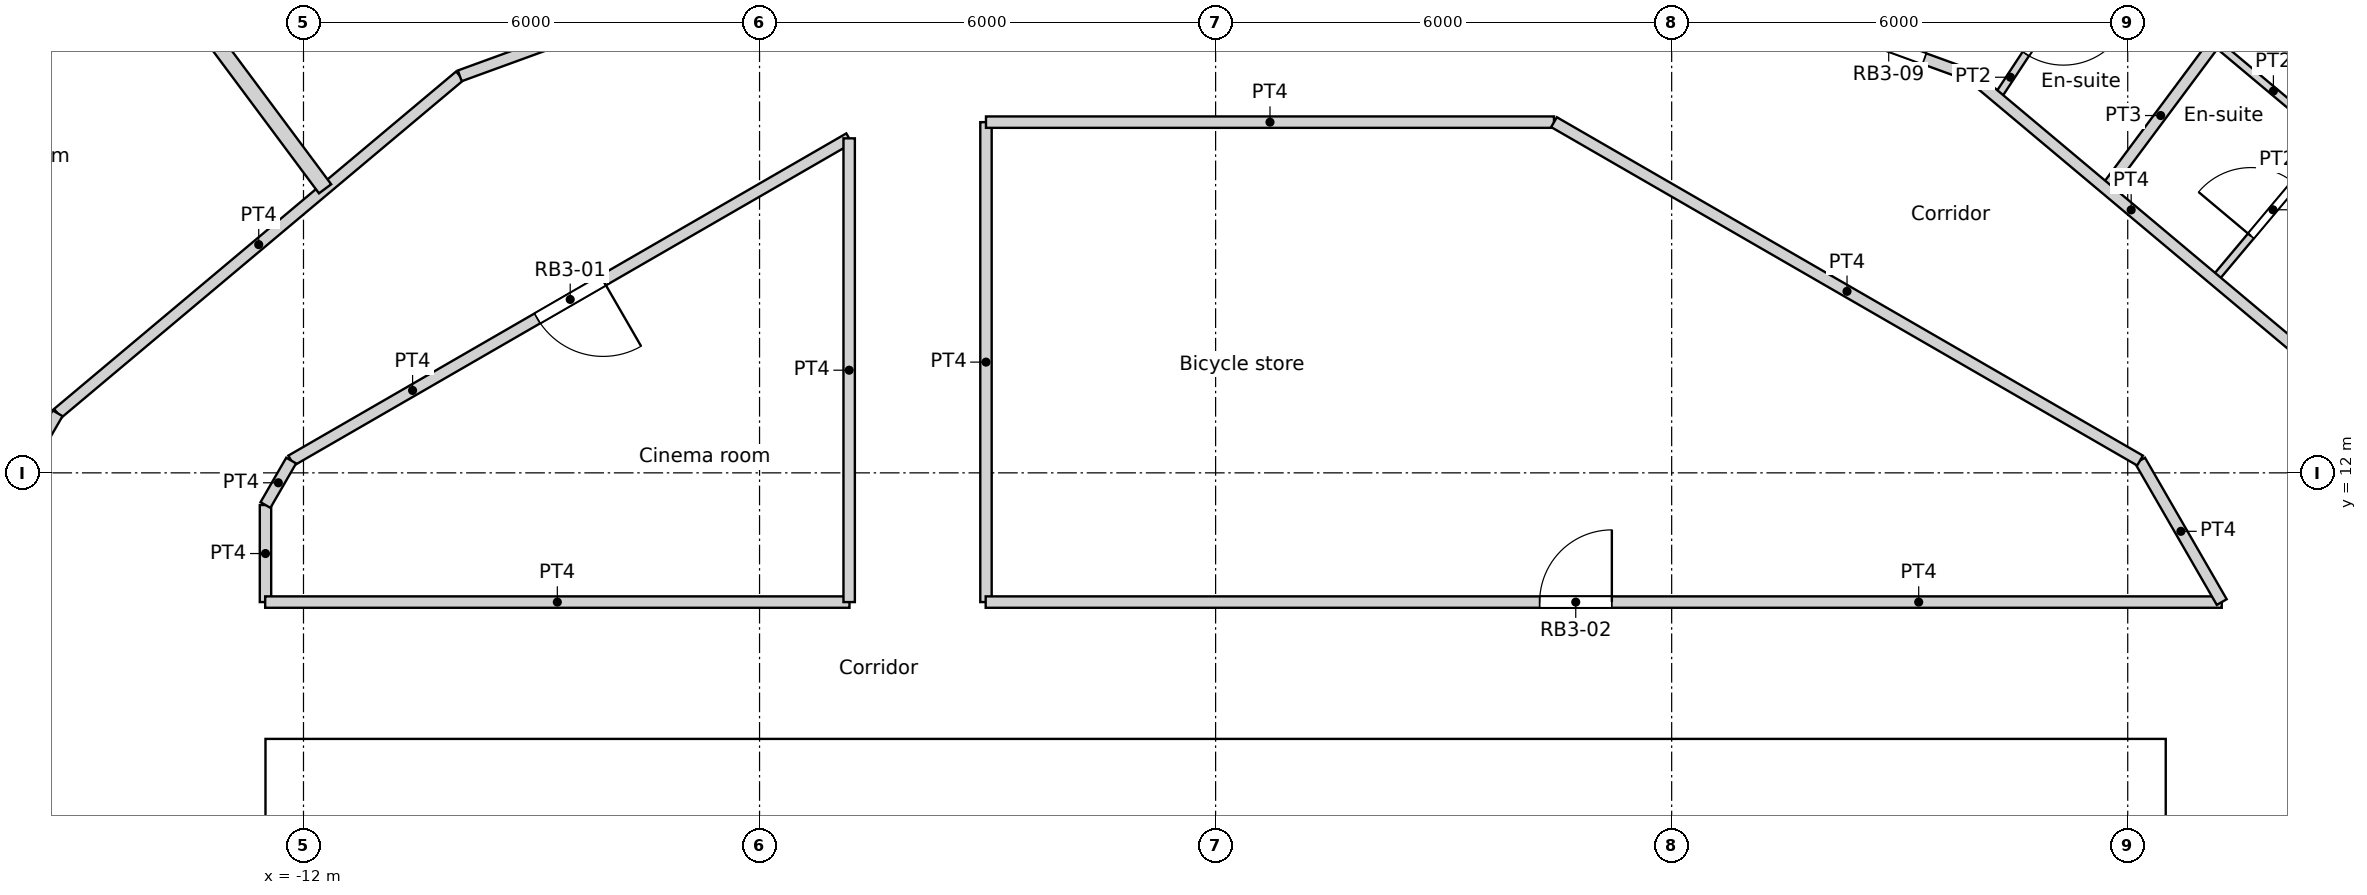
"""IFC4 building model, lengths in metres.
Left out: names, types, materials, properties, quantities, classifications, styles, units other than length and angle.
Written with IfcOpenShell. Run it as: python <this file> out.ifc"""

import sys

from ifc_helpers import new_model, si_unit, direction, frame, frame_2d, origin, origin_2d, place, context, subcontext, project, spatial, rectangle, circle, extrude, element, fill, save


model = new_model("IFC4")
c1 = context("Model", 3, precision=1e-05, world=origin(), true_north=direction((0.0, 1.0)))
c2 = subcontext(c1, "Body", "Model", "MODEL_VIEW")
j1 = project(units=[si_unit("LENGTHUNIT", "METRE"), si_unit("PLANEANGLEUNIT", "RADIAN")], contexts=[c1])
p1 = place(None, origin())
s1 = spatial("IfcSite", under=j1, at=p1, CompositionType="ELEMENT")
p2 = place(p1, origin())
s2 = spatial("IfcBuilding", under=s1, at=p2, CompositionType="ELEMENT")
p3 = place(p2, frame((0.0, 0.0, 147.6)))
s3 = spatial("IfcBuildingStorey", under=s2, at=p3, CompositionType="ELEMENT", Elevation=147.6)
for number, where, z_axis, x_axis in (
    (1, (11.735, 14.716, 0.0), (0.0, 0.0, 1.0), (1.0, 0.0, 0.0)),
    (2, (6.876, 17.521, 0.0), (0.0, 0.0, 1.0), (1.0, 0.0, 0.0)),
    (3, (-9.411, 16.301, 0.0), (0.0, 0.0, 1.0), (1.0, 0.0, 0.0)),
    (4, (-13.798, 12.802, 0.0), (0.0, 0.0, 1.0), (1.0, 0.0, 0.0)),
):
    element("IfcColumn", number, at=place(p3, frame(where, z_axis=z_axis, x_axis=x_axis)), inside=s3, PredefinedType="COLUMN", context=c2, shape_type="SweptSolid", body=[
        extrude(circle(Radius=0.65, at=origin_2d()), origin(), (0.0, 0.0, 1.0), 3.6),
    ])
p4 = place(p3, frame((-12.5, 8.05, 0.0), z_axis=(0.0, 0.0, 1.0), x_axis=(1.0, 0.0, 0.0)))
e5 = element("IfcWall", 5, at=p4, inside=s3, PredefinedType="SOLIDWALL", context=c2, shape_type="SweptSolid", body=[
    extrude(rectangle(XDim=25.0, YDim=0.9, at=frame_2d((12.5, 0.0))), origin(), (0.0, 0.0, 1.0), 3.6),
])
p5 = place(p4, frame((8.3, 0.0, 0.0)))
e6 = element("IfcOpeningElement", 6, at=p5, cuts=e5, PredefinedType="OPENING", context=c2, shape_type="SweptSolid", body=[
    extrude(rectangle(XDim=1.8, YDim=2.1, at=frame_2d((0.9, 1.05))), frame((0.0, 0.45, 0.0), z_axis=(0.0, -1.0, 0.0), x_axis=(1.0, 0.0, 0.0)), (0.0, 0.0, 1.0), 0.9),
])
p6 = place(p3, frame((-12.05, -7.6, 0.0), z_axis=(0.0, 0.0, 1.0), x_axis=(0.0, 1.0, 0.0)))
e7 = element("IfcWall", 7, at=p6, inside=s3, PredefinedType="SOLIDWALL", context=c2, shape_type="SweptSolid", body=[
    extrude(rectangle(XDim=15.2, YDim=0.9, at=frame_2d((7.6, 0.0))), origin(), (0.0, 0.0, 1.0), 3.6),
])
p7 = place(p6, frame((7.1, 0.0, 0.0)))
e8 = element("IfcOpeningElement", 8, at=p7, cuts=e7, PredefinedType="OPENING", context=c2, shape_type="SweptSolid", body=[
    extrude(rectangle(XDim=1.0, YDim=2.1, at=frame_2d((0.5, 1.05))), frame((0.0, 0.45, 0.0), z_axis=(0.0, -1.0, 0.0), x_axis=(1.0, 0.0, 0.0)), (0.0, 0.0, 1.0), 0.9),
])
p8 = place(p3, frame((12.05, -7.6, 0.0), z_axis=(0.0, 0.0, 1.0), x_axis=(0.0, 1.0, 0.0)))
e9 = element("IfcWall", 9, at=p8, inside=s3, PredefinedType="SOLIDWALL", context=c2, shape_type="SweptSolid", body=[
    extrude(rectangle(XDim=15.2, YDim=0.9, at=frame_2d((7.6, 0.0))), origin(), (0.0, 0.0, 1.0), 3.6),
])
p9 = place(p8, frame((5.1, 0.0, 0.0)))
e10 = element("IfcOpeningElement", 10, at=p9, cuts=e9, PredefinedType="OPENING", context=c2, shape_type="SweptSolid", body=[
    extrude(rectangle(XDim=1.0, YDim=2.1, at=frame_2d((0.5, 1.05))), frame((0.0, 0.45, 0.0), z_axis=(0.0, -1.0, 0.0), x_axis=(1.0, 0.0, 0.0)), (0.0, 0.0, 1.0), 0.9),
])
for number, where, z_axis, x_axis in (
    (11, (-2.25, 3.25, 0.0), (0.0, 0.0, 1.0), (0.0, 1.0, 0.0)),
    (12, (0.55, 3.25, 0.0), (0.0, 0.0, 1.0), (0.0, 1.0, 0.0)),
):
    element("IfcWall", number, at=place(p3, frame(where, z_axis=z_axis, x_axis=x_axis)), inside=s3, PredefinedType="SOLIDWALL", context=c2, shape_type="SweptSolid", body=[
        extrude(rectangle(XDim=4.35, YDim=0.3, at=frame_2d((2.175, 0.0))), origin(), (0.0, 0.0, 1.0), 3.3),
    ])
p10 = place(p3, frame((-9.05, -7.0, 0.0), z_axis=(0.0, 0.0, 1.0), x_axis=(0.0, 1.0, 0.0)))
e13 = element("IfcWall", 13, at=p10, inside=s3, PredefinedType="SOLIDWALL", context=c2, shape_type="SweptSolid", body=[
    extrude(rectangle(XDim=14.6, YDim=0.3, at=frame_2d((7.3, 0.0))), origin(), (0.0, 0.0, 1.0), 3.3),
])
p11 = place(p3, frame((-4.275, 6.7, 0.0), z_axis=(0.0, 0.0, 1.0), x_axis=(0.0, 1.0, 0.0)))
e14 = element("IfcWall", 14, at=p11, inside=s3, PredefinedType="SOLIDWALL", context=c2, shape_type="SweptSolid", body=[
    extrude(rectangle(XDim=0.9, YDim=0.15, at=frame_2d((0.45, 0.0))), origin(), (0.0, 0.0, 1.0), 3.3),
])
p12 = place(p3, frame((0.7, 7.15, 0.0), z_axis=(0.0, 0.0, 1.0), x_axis=(1.0, 0.0, 0.0)))
e15 = element("IfcWall", 15, at=p12, inside=s3, PredefinedType="SOLIDWALL", context=c2, shape_type="SweptSolid", body=[
    extrude(rectangle(XDim=8.35, YDim=0.9, at=frame_2d((4.175, 0.0))), origin(), (0.0, 0.0, 1.0), 3.3),
])
p13 = place(p3, frame((-12.504, 10.3, 0.0), z_axis=(0.0, 0.0, 1.0), x_axis=(1.0, 0.0, 0.0)))
e16 = element("IfcWall", 16, at=p13, inside=s3, PredefinedType="PARTITIONING", context=c2, shape_type="SweptSolid", body=[
    extrude(rectangle(XDim=7.687, YDim=0.15, at=frame_2d((3.844, 0.0))), origin(), (0.0, 0.0, 1.0), 3.3),
])
p14 = place(p3, frame((-3.025, 10.3, 0.0), z_axis=(0.0, 0.0, 1.0), x_axis=(1.0, 0.0, 0.0)))
e17 = element("IfcWall", 17, at=p14, inside=s3, PredefinedType="PARTITIONING", context=c2, shape_type="SweptSolid", body=[
    extrude(rectangle(XDim=16.262, YDim=0.15, at=frame_2d((8.131, 0.0))), origin(), (0.0, 0.0, 1.0), 3.3),
])
p15 = place(p14, frame((7.288, 0.0, 0.0)))
e18 = element("IfcOpeningElement", 18, at=p15, cuts=e17, PredefinedType="OPENING", context=c2, shape_type="SweptSolid", body=[
    extrude(rectangle(XDim=0.95, YDim=2.1, at=frame_2d((0.475, 1.05))), frame((0.0, 0.075, 0.0), z_axis=(0.0, -1.0, 0.0), x_axis=(1.0, 0.0, 0.0)), (0.0, 0.0, 1.0), 0.15),
])
p16 = place(p3, frame((12.162, 12.162, 0.0), z_axis=(0.0, 0.0, 1.0), x_axis=(0.499961633463, -0.866047553582, 0.0)))
e19 = element("IfcWall", 19, at=p16, inside=s3, PredefinedType="PARTITIONING", context=c2, shape_type="SweptSolid", body=[
    extrude(rectangle(XDim=2.15, YDim=0.15, at=frame_2d((1.075, 0.0))), origin(), (0.0, 0.0, 1.0), 3.3),
])
p17 = place(p3, frame((9.943, 17.222, 0.0), z_axis=(0.0, 0.0, 1.0), x_axis=(0.766192104565, -0.642611592567, 0.0)))
e20 = element("IfcWall", 20, at=p17, inside=s3, PredefinedType="PARTITIONING", context=c2, shape_type="SweptSolid", body=[
    extrude(rectangle(XDim=6.906, YDim=0.15, at=frame_2d((3.453, 0.0))), origin(), (0.0, 0.0, 1.0), 3.3),
])
p18 = place(p17, frame((5.537, 0.0, 0.0)))
e21 = element("IfcOpeningElement", 21, at=p18, cuts=e20, PredefinedType="OPENING", context=c2, shape_type="SweptSolid", body=[
    extrude(rectangle(XDim=1.0, YDim=2.1, at=frame_2d((0.5, 1.05))), frame((0.0, 0.075, 0.0), z_axis=(0.0, -1.0, 0.0), x_axis=(1.0, 0.0, 0.0)), (0.0, 0.0, 1.0), 0.15),
])
p19 = place(p3, frame((-4.821, 10.3, 0.0), z_axis=(0.0, 0.0, 1.0), x_axis=(0.0, 1.0, 0.0)))
e22 = element("IfcWall", 22, at=p19, inside=s3, PredefinedType="PARTITIONING", context=c2, shape_type="SweptSolid", body=[
    extrude(rectangle(XDim=6.101, YDim=0.15, at=frame_2d((3.05, 0.0))), origin(), (0.0, 0.0, 1.0), 3.3),
])
p20 = place(p3, frame((-12.162, 12.162, 0.0), z_axis=(0.0, 0.0, 1.0), x_axis=(0.866004766557, 0.500035743023, 0.0)))
e23 = element("IfcWall", 23, at=p20, inside=s3, PredefinedType="PARTITIONING", context=c2, shape_type="SweptSolid", body=[
    extrude(rectangle(XDim=8.477, YDim=0.15, at=frame_2d((4.239, 0.0))), origin(), (0.0, 0.0, 1.0), 3.3),
])
p21 = place(p20, frame((3.739, 0.0, 0.0)))
e24 = element("IfcOpeningElement", 24, at=p21, cuts=e23, PredefinedType="OPENING", context=c2, shape_type="SweptSolid", body=[
    extrude(rectangle(XDim=1.0, YDim=2.04, at=frame_2d((0.5, 1.02))), frame((0.0, 0.075, 0.0), z_axis=(0.0, -1.0, 0.0), x_axis=(1.0, 0.0, 0.0)), (0.0, 0.0, 1.0), 0.15),
])
p22 = place(p3, frame((4.452, 16.614, 0.0), z_axis=(0.0, 0.0, 1.0), x_axis=(0.866005203721, -0.500034985904, 0.0)))
e25 = element("IfcWall", 25, at=p22, inside=s3, PredefinedType="PARTITIONING", context=c2, shape_type="SweptSolid", body=[
    extrude(rectangle(XDim=8.903, YDim=0.15, at=frame_2d((4.452, 0.0))), origin(), (0.0, 0.0, 1.0), 3.3),
])
p23 = place(p3, frame((-3.021, 16.614, 0.0), z_axis=(0.0, 0.0, 1.0), x_axis=(1.0, 0.0, 0.0)))
e26 = element("IfcWall", 26, at=p23, inside=s3, PredefinedType="PARTITIONING", context=c2, shape_type="SweptSolid", body=[
    extrude(rectangle(XDim=7.473, YDim=0.15, at=frame_2d((3.736, 0.0))), origin(), (0.0, 0.0, 1.0), 3.3),
])
p24 = place(p3, frame((-3.021, 10.3, 0.0), z_axis=(0.0, 0.0, 1.0), x_axis=(0.0, 1.0, 0.0)))
e27 = element("IfcWall", 27, at=p24, inside=s3, PredefinedType="PARTITIONING", context=c2, shape_type="SweptSolid", body=[
    extrude(rectangle(XDim=6.314, YDim=0.15, at=frame_2d((3.157, 0.0))), origin(), (0.0, 0.0, 1.0), 3.3),
])
p25 = place(p3, frame((3.452, 19.585, 0.0), z_axis=(0.0, 0.0, 1.0), x_axis=(0.939737689664, -0.341896292208, 0.0)))
e28 = element("IfcWall", 28, at=p25, inside=s3, PredefinedType="PARTITIONING", context=c2, shape_type="SweptSolid", body=[
    extrude(rectangle(XDim=6.908, YDim=0.15, at=frame_2d((3.454, 0.0))), origin(), (0.0, 0.0, 1.0), 3.3),
])
p26 = place(p25, frame((5.249, 0.0, 0.0)))
e29 = element("IfcOpeningElement", 29, at=p26, cuts=e28, PredefinedType="OPENING", context=c2, shape_type="SweptSolid", body=[
    extrude(rectangle(XDim=1.0, YDim=2.1, at=frame_2d((0.5, 1.05))), frame((0.0, 0.075, 0.0), z_axis=(0.0, -1.0, 0.0), x_axis=(1.0, 0.0, 0.0)), (0.0, 0.0, 1.0), 0.15),
])
p27 = place(p25, frame((0.87, 0.0, 0.0)))
e30 = element("IfcOpeningElement", 30, at=p27, cuts=e28, PredefinedType="OPENING", context=c2, shape_type="SweptSolid", body=[
    extrude(rectangle(XDim=1.0, YDim=2.1, at=frame_2d((0.5, 1.05))), frame((0.0, 0.075, 0.0), z_axis=(0.0, -1.0, 0.0), x_axis=(1.0, 0.0, 0.0)), (0.0, 0.0, 1.0), 0.15),
])
p28 = place(p3, frame((-15.234, 12.783, 0.0), z_axis=(0.0, 0.0, 1.0), x_axis=(0.765936018543, 0.642916802937, 0.0)))
e31 = element("IfcWall", 31, at=p28, inside=s3, PredefinedType="PARTITIONING", context=c2, shape_type="SweptSolid", body=[
    extrude(rectangle(XDim=6.906, YDim=0.15, at=frame_2d((3.453, 0.0))), origin(), (0.0, 0.0, 1.0), 3.3),
])
p29 = place(p3, frame((-9.944, 17.223, 0.0), z_axis=(0.0, 0.0, 1.0), x_axis=(0.939672634566, 0.342075050021, 0.0)))
e32 = element("IfcWall", 32, at=p29, inside=s3, PredefinedType="PARTITIONING", context=c2, shape_type="SweptSolid", body=[
    extrude(rectangle(XDim=6.908, YDim=0.15, at=frame_2d((3.454, 0.0))), origin(), (0.0, 0.0, 1.0), 3.3),
])
p30 = place(p29, frame((2.704, 0.0, 0.0)))
e33 = element("IfcOpeningElement", 33, at=p30, cuts=e32, PredefinedType="OPENING", context=c2, shape_type="SweptSolid", body=[
    extrude(rectangle(XDim=1.5, YDim=2.1, at=frame_2d((0.75, 1.05))), frame((0.0, 0.075, 0.0), z_axis=(0.0, -1.0, 0.0), x_axis=(1.0, 0.0, 0.0)), (0.0, 0.0, 1.0), 0.15),
])
p31 = place(p3, frame((-12.5, 11.577, 0.0), z_axis=(0.0, 0.0, 1.0), x_axis=(0.500024767483, 0.866011103799, 0.0)))
e34 = element("IfcWall", 34, at=p31, inside=s3, PredefinedType="PARTITIONING", context=c2, shape_type="SweptSolid", body=[
    extrude(rectangle(XDim=0.676, YDim=0.15, at=frame_2d((0.338, 0.0))), origin(), (0.0, 0.0, 1.0), 3.3),
])
p32 = place(p3, frame((-12.5, 10.3, 0.0), z_axis=(0.0, 0.0, 1.0), x_axis=(0.0, 1.0, 0.0)))
e35 = element("IfcWall", 35, at=p32, inside=s3, PredefinedType="PARTITIONING", context=c2, shape_type="SweptSolid", body=[
    extrude(rectangle(XDim=1.277, YDim=0.15, at=frame_2d((0.638, 0.0))), origin(), (0.0, 0.0, 1.0), 3.3),
])
p33 = place(p3, frame((-18.688, 6.802, 0.0), z_axis=(0.0, 0.0, 1.0), x_axis=(0.499914202267, 0.866074933462, 0.0)))
e36 = element("IfcWall", 36, at=p33, inside=s3, PredefinedType="PARTITIONING", context=c2, shape_type="SweptSolid", body=[
    extrude(rectangle(XDim=6.907, YDim=0.15, at=frame_2d((3.454, 0.0))), origin(), (0.0, 0.0, 1.0), 3.3),
])
p34 = place(p33, frame((3.004, 0.0, 0.0)))
e37 = element("IfcOpeningElement", 37, at=p34, cuts=e36, PredefinedType="OPENING", context=c2, shape_type="SweptSolid", body=[
    extrude(rectangle(XDim=1.0, YDim=2.04, at=frame_2d((0.5, 1.02))), frame((0.0, 0.075, 0.0), z_axis=(0.0, -1.0, 0.0), x_axis=(1.0, 0.0, 0.0)), (0.0, 0.0, 1.0), 0.15),
])
p35 = place(p3, frame((13.139, 14.542, 0.0), z_axis=(0.0, 0.0, 1.0), x_axis=(0.642731657745, 0.766091388891, 0.0)))
e38 = element("IfcWall", 38, at=p35, inside=s3, PredefinedType="PARTITIONING", context=c2, shape_type="SweptSolid", body=[
    extrude(rectangle(XDim=2.401, YDim=0.1, at=frame_2d((1.2, 0.0))), origin(), (0.0, 0.0, 1.0), 3.3),
])
p36 = place(p35, frame((0.75, 0.0, 0.0)))
e39 = element("IfcOpeningElement", 39, at=p36, cuts=e38, PredefinedType="OPENING", context=c2, shape_type="SweptSolid", body=[
    extrude(rectangle(XDim=0.9, YDim=2.04, at=frame_2d((0.45, 1.02))), frame((0.0, 0.05, 0.0), z_axis=(0.0, -1.0, 0.0), x_axis=(1.0, 0.0, 0.0)), (0.0, 0.0, 1.0), 0.1),
])
p37 = place(p3, frame((13.151, 17.665, 0.0), z_axis=(0.0, 0.0, 1.0), x_axis=(0.766224532916, -0.642572925945, 0.0)))
e40 = element("IfcWall", 40, at=p37, inside=s3, PredefinedType="PARTITIONING", context=c2, shape_type="SweptSolid", body=[
    extrude(rectangle(XDim=1.998, YDim=0.1, at=frame_2d((0.999, 0.0))), origin(), (0.0, 0.0, 1.0), 3.3),
])
p38 = place(p3, frame((11.716, 15.737, 0.0), z_axis=(0.0, 0.0, 1.0), x_axis=(0.597021412293, 0.802225300813, 0.0)))
e41 = element("IfcWall", 41, at=p38, inside=s3, PredefinedType="PARTITIONING", context=c2, shape_type="SweptSolid", body=[
    extrude(rectangle(XDim=2.403, YDim=0.15, at=frame_2d((1.202, 0.0))), origin(), (0.0, 0.0, 1.0), 3.3),
])
p39 = place(p3, frame((10.282, 16.939, 0.0), z_axis=(0.0, 0.0, 1.0), x_axis=(0.549730960803, 0.83534176882, 0.0)))
e42 = element("IfcWall", 42, at=p39, inside=s3, PredefinedType="PARTITIONING", context=c2, shape_type="SweptSolid", body=[
    extrude(rectangle(XDim=2.272, YDim=0.1, at=frame_2d((1.136, 0.0))), origin(), (0.0, 0.0, 1.0), 3.3),
])
p40 = place(p39, frame((0.686, 0.0, 0.0)))
e43 = element("IfcOpeningElement", 43, at=p40, cuts=e42, PredefinedType="OPENING", context=c2, shape_type="SweptSolid", body=[
    extrude(rectangle(XDim=0.9, YDim=2.04, at=frame_2d((0.45, 1.02))), frame((0.0, 0.05, 0.0), z_axis=(0.0, -1.0, 0.0), x_axis=(1.0, 0.0, 0.0)), (0.0, 0.0, 1.0), 0.1),
])
p41 = place(p3, frame((-15.226, 20.452, 0.0), z_axis=(0.0, 0.0, 1.0), x_axis=(0.597151875745, -0.802128192557, 0.0)))
e44 = element("IfcWall", 44, at=p41, inside=s3, PredefinedType="PARTITIONING", context=c2, shape_type="SweptSolid", body=[
    extrude(rectangle(XDim=5.878, YDim=0.2, at=frame_2d((2.939, 0.0))), origin(), (0.0, 0.0, 1.0), 3.3),
])
p42 = place(p5, origin())
e45 = element("IfcDoor", 45, at=p42, inside=s3, OperationType="DOUBLE_DOOR_SINGLE_SWING", PredefinedType="DOOR", context=c2, shape_type="SweptSolid", body=[
    extrude(rectangle(XDim=1.8, YDim=2.1, at=frame_2d((0.9, 1.05))), frame((0.0, 0.025, 0.0), z_axis=(0.0, -1.0, 0.0), x_axis=(1.0, 0.0, 0.0)), (0.0, 0.0, 1.0), 0.05),
])
fill(e6, e45)
p43 = place(p21, origin())
e46 = element("IfcDoor", 46, at=p43, inside=s3, OperationType="SINGLE_SWING_LEFT", PredefinedType="DOOR", context=c2, shape_type="SweptSolid", body=[
    extrude(rectangle(XDim=1.0, YDim=2.04, at=frame_2d((0.5, 1.02))), frame((0.0, 0.025, 0.0), z_axis=(0.0, -1.0, 0.0), x_axis=(1.0, 0.0, 0.0)), (0.0, 0.0, 1.0), 0.05),
])
fill(e24, e46)
p44 = place(p15, origin())
e47 = element("IfcDoor", 47, at=p44, inside=s3, OperationType="SINGLE_SWING_RIGHT", PredefinedType="DOOR", context=c2, shape_type="SweptSolid", body=[
    extrude(rectangle(XDim=0.95, YDim=2.1, at=frame_2d((0.475, 1.05))), frame((0.0, 0.025, 0.0), z_axis=(0.0, -1.0, 0.0), x_axis=(1.0, 0.0, 0.0)), (0.0, 0.0, 1.0), 0.05),
])
fill(e18, e47)
p45 = place(p36, origin())
e48 = element("IfcDoor", 48, at=p45, inside=s3, OperationType="SINGLE_SWING_LEFT", PredefinedType="DOOR", context=c2, shape_type="SweptSolid", body=[
    extrude(rectangle(XDim=0.9, YDim=2.04, at=frame_2d((0.45, 1.02))), frame((0.0, 0.025, 0.0), z_axis=(0.0, -1.0, 0.0), x_axis=(1.0, 0.0, 0.0)), (0.0, 0.0, 1.0), 0.05),
])
fill(e39, e48)
p46 = place(p40, origin())
e49 = element("IfcDoor", 49, at=p46, inside=s3, OperationType="SINGLE_SWING_LEFT", PredefinedType="DOOR", context=c2, shape_type="SweptSolid", body=[
    extrude(rectangle(XDim=0.9, YDim=2.04, at=frame_2d((0.45, 1.02))), frame((0.0, 0.025, 0.0), z_axis=(0.0, -1.0, 0.0), x_axis=(1.0, 0.0, 0.0)), (0.0, 0.0, 1.0), 0.05),
])
fill(e43, e49)
p47 = place(p26, origin())
e50 = element("IfcDoor", 50, at=p47, inside=s3, OperationType="SINGLE_SWING_LEFT", PredefinedType="DOOR", context=c2, shape_type="SweptSolid", body=[
    extrude(rectangle(XDim=1.0, YDim=2.1, at=frame_2d((0.5, 1.05))), frame((0.0, 0.025, 0.0), z_axis=(0.0, -1.0, 0.0), x_axis=(1.0, 0.0, 0.0)), (0.0, 0.0, 1.0), 0.05),
])
fill(e29, e50)
save(model, sys.argv[1])
